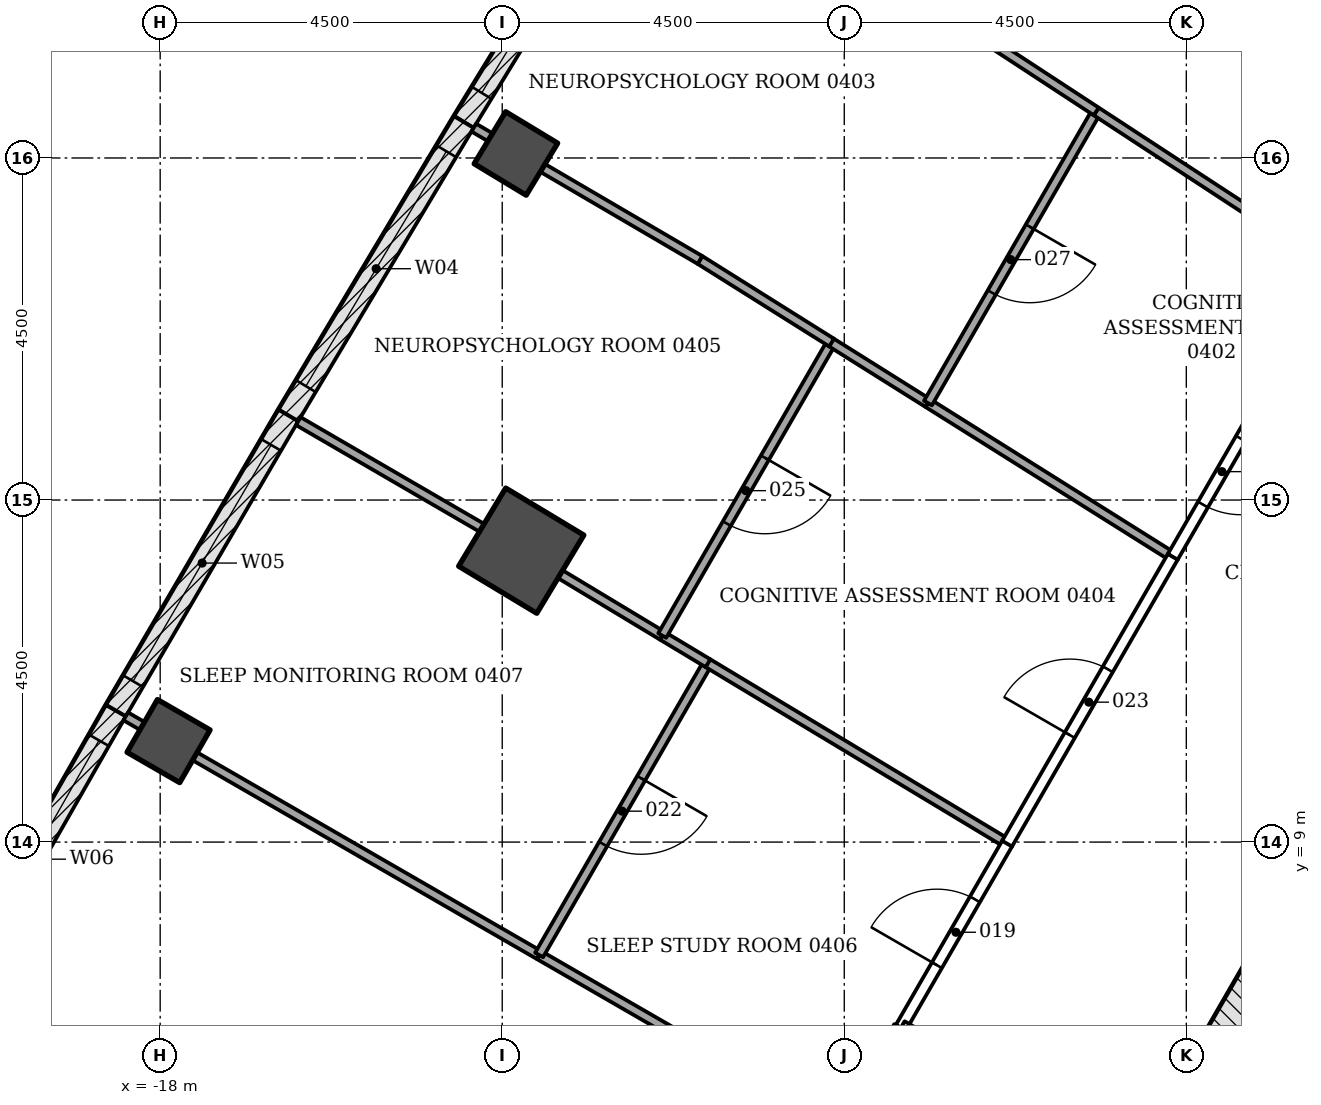
"""IFC4 building model, lengths in metres.
Left out: names, types, materials, properties, quantities, classifications, styles, units other than length and angle.
Written with IfcOpenShell. Run it as: python <this file> out.ifc"""

import sys

from ifc_helpers import new_model, si_unit, direction, frame, frame_2d, origin, origin_2d, place, context, subcontext, project, spatial, rectangle, extrude, element, fill, save


model = new_model("IFC4")
c1 = context("Model", 3, precision=1e-05, world=origin(), true_north=direction((0.0, 1.0)))
c2 = subcontext(c1, "Body", "Model", "MODEL_VIEW")
j1 = project(units=[si_unit("LENGTHUNIT", "METRE"), si_unit("PLANEANGLEUNIT", "RADIAN")], contexts=[c1])
p1 = place(None, origin())
s1 = spatial("IfcSite", under=j1, at=p1, CompositionType="ELEMENT")
p2 = place(p1, origin())
s2 = spatial("IfcBuilding", under=s1, at=p2, CompositionType="ELEMENT")
p3 = place(p2, frame((0.0, 0.0, 19.5)))
s3 = spatial("IfcBuildingStorey", under=s2, at=p3, CompositionType="ELEMENT", Elevation=19.5)
p4 = place(p3, frame((-13.25, 12.834, -0.25), z_axis=(0.0, 0.0, 1.0), x_axis=(-0.856599929156, 0.515981163775, 0.0)))
e1 = element("IfcColumn", 1, at=p4, inside=s3, PredefinedType="COLUMN", context=c2, shape_type="SweptSolid", body=[
    extrude(rectangle(XDim=1.2, YDim=1.2, at=origin_2d()), origin(), (0.0, 0.0, 1.0), 4.55),
])
for number, where, z_axis, x_axis in (
    (2, (-13.32, 18.059, -0.25), (0.0, 0.0, 1.0), (-0.856, 0.518, 0.0)),
    (3, (-17.89, 10.329, -0.25), (0.0, 0.0, 1.0), (-0.866, 0.5, 0.0)),
):
    element("IfcColumn", number, at=place(p3, frame(where, z_axis=z_axis, x_axis=x_axis)), inside=s3, PredefinedType="COLUMN", context=c2, shape_type="SweptSolid", body=[
        extrude(rectangle(XDim=0.8, YDim=0.8, at=origin_2d()), origin(), (0.0, 0.0, 1.0), 4.55),
    ])
p5 = place(p3, frame((-1.083, 11.281, -0.25), z_axis=(0.0, 0.0, 1.0), x_axis=(-0.500001446645, -0.866024568562, 0.0)))
e4 = element("IfcWall", 4, at=p5, inside=s3, PredefinedType="SHEAR", context=c2, shape_type="SweptSolid", body=[
    extrude(rectangle(XDim=18.458, YDim=0.7, at=frame_2d((9.229, 0.0))), origin(), (0.0, 0.0, 1.0), 4.55),
])
p6 = place(p5, frame((8.979, 0.0, 0.25)))
e5 = element("IfcOpeningElement", 5, at=p6, cuts=e4, PredefinedType="OPENING", context=c2, shape_type="SweptSolid", body=[
    extrude(rectangle(XDim=1.2, YDim=2.1, at=frame_2d((0.6, 1.05))), frame((0.0, 0.36, 0.0), z_axis=(0.0, -1.0, 0.0), x_axis=(1.0, 0.0, 0.0)), (0.0, 0.0, 1.0), 0.72),
])
p7 = place(p5, frame((11.029, 0.0, 0.25)))
e6 = element("IfcOpeningElement", 6, at=p7, cuts=e4, PredefinedType="OPENING", context=c2, shape_type="SweptSolid", body=[
    extrude(rectangle(XDim=1.2, YDim=2.1, at=frame_2d((0.6, 1.05))), frame((0.0, 0.36, 0.0), z_axis=(0.0, -1.0, 0.0), x_axis=(1.0, 0.0, 0.0)), (0.0, 0.0, 1.0), 0.72),
])
p8 = place(p3, frame((-14.004, 18.475, 0.0), z_axis=(0.0, 0.0, 1.0), x_axis=(0.522078085402, 0.852897691838, 0.0)))
e7 = element("IfcWall", 7, at=p8, inside=s3, PredefinedType="NOTDEFINED", context=c2, shape_type="SweptSolid", body=[
    extrude(rectangle(XDim=4.496, YDim=0.3, at=frame_2d((2.248, 0.0))), origin(), (0.0, 0.0, 1.0), 4.3),
])
p9 = place(p8, frame((0.448, 0.0, 1.5)))
e8 = element("IfcOpeningElement", 8, at=p9, cuts=e7, PredefinedType="OPENING", context=c2, shape_type="SweptSolid", body=[
    extrude(rectangle(XDim=3.6, YDim=1.8, at=frame_2d((1.8, 0.9))), frame((0.0, 0.16, 0.0), z_axis=(0.0, -1.0, 0.0), x_axis=(1.0, 0.0, 0.0)), (0.0, 0.0, 1.0), 0.32),
])
p10 = place(p3, frame((-16.313, 14.614, 0.0), z_axis=(0.0, 0.0, 1.0), x_axis=(0.513257465408, 0.858234684805, 0.0)))
e9 = element("IfcWall", 9, at=p10, inside=s3, PredefinedType="NOTDEFINED", context=c2, shape_type="SweptSolid", body=[
    extrude(rectangle(XDim=4.496, YDim=0.3, at=frame_2d((2.248, 0.0))), origin(), (0.0, 0.0, 1.0), 4.3),
])
p11 = place(p10, frame((0.448, 0.0, 1.5)))
e10 = element("IfcOpeningElement", 10, at=p11, cuts=e9, PredefinedType="OPENING", context=c2, shape_type="SweptSolid", body=[
    extrude(rectangle(XDim=3.6, YDim=1.8, at=frame_2d((1.8, 0.9))), frame((0.0, 0.16, 0.0), z_axis=(0.0, -1.0, 0.0), x_axis=(1.0, 0.0, 0.0)), (0.0, 0.0, 1.0), 0.32),
])
p12 = place(p3, frame((-18.582, 10.73, 0.0), z_axis=(0.0, 0.0, 1.0), x_axis=(0.50445499627, 0.86343798662, 0.0)))
e11 = element("IfcWall", 11, at=p12, inside=s3, PredefinedType="NOTDEFINED", context=c2, shape_type="SweptSolid", body=[
    extrude(rectangle(XDim=4.496, YDim=0.3, at=frame_2d((2.248, 0.0))), origin(), (0.0, 0.0, 1.0), 4.3),
])
p13 = place(p12, frame((0.448, 0.0, 1.5)))
e12 = element("IfcOpeningElement", 12, at=p13, cuts=e11, PredefinedType="OPENING", context=c2, shape_type="SweptSolid", body=[
    extrude(rectangle(XDim=3.6, YDim=1.8, at=frame_2d((1.8, 0.9))), frame((0.0, 0.16, 0.0), z_axis=(0.0, -1.0, 0.0), x_axis=(1.0, 0.0, 0.0)), (0.0, 0.0, 1.0), 0.32),
])
p14 = place(p3, frame((-20.811, 6.823, 0.0), z_axis=(0.0, 0.0, 1.0), x_axis=(0.495524760411, 0.868593812907, 0.0)))
e13 = element("IfcWall", 13, at=p14, inside=s3, PredefinedType="NOTDEFINED", context=c2, shape_type="SweptSolid", body=[
    extrude(rectangle(XDim=4.496, YDim=0.3, at=frame_2d((2.248, 0.0))), origin(), (0.0, 0.0, 1.0), 4.3),
])
p15 = place(p14, frame((0.448, 0.0, 1.5)))
e14 = element("IfcOpeningElement", 14, at=p15, cuts=e13, PredefinedType="OPENING", context=c2, shape_type="SweptSolid", body=[
    extrude(rectangle(XDim=3.6, YDim=1.8, at=frame_2d((1.8, 0.9))), frame((0.0, 0.16, 0.0), z_axis=(0.0, -1.0, 0.0), x_axis=(1.0, 0.0, 0.0)), (0.0, 0.0, 1.0), 0.32),
])
p16 = place(p3, frame((0.176, 6.711, 0.0), z_axis=(0.0, 0.0, 1.0), x_axis=(-0.500004227369, -0.866022963098, 0.0)))
e15 = element("IfcWall", 15, at=p16, inside=s3, PredefinedType="PARTITIONING", context=c2, shape_type="SweptSolid", body=[
    extrude(rectangle(XDim=11.8, YDim=0.25, at=frame_2d((5.9, 0.0))), origin(), (0.0, 0.0, 1.0), 4.3),
])
p17 = place(p3, frame((-18.26, 5.356, 0.0), z_axis=(0.0, 0.0, 1.0), x_axis=(-0.867283853893, 0.49781393791, 0.0)))
e16 = element("IfcWall", 16, at=p17, inside=s3, PredefinedType="PARTITIONING", context=c2, shape_type="SweptSolid", body=[
    extrude(rectangle(XDim=2.792, YDim=0.12, at=frame_2d((1.396, 0.0))), origin(), (0.0, 0.0, 1.0), 3.683),
])
p18 = place(p3, frame((-8.256, 6.555, 0.0), z_axis=(0.0, 0.0, 1.0), x_axis=(-0.499904469662, -0.866080551226, 0.0)))
e17 = element("IfcWall", 17, at=p18, inside=s3, PredefinedType="PARTITIONING", context=c2, shape_type="SweptSolid", body=[
    extrude(rectangle(XDim=1.548, YDim=0.2, at=frame_2d((0.774, 0.0))), origin(), (0.0, 0.0, 1.0), 3.688),
])
p19 = place(p3, frame((-5.226, 4.806, 0.0), z_axis=(0.0, 0.0, 1.0), x_axis=(-0.865949687125, 0.500131122175, 0.0)))
e18 = element("IfcWall", 18, at=p19, inside=s3, PredefinedType="PARTITIONING", context=c2, shape_type="SweptSolid", body=[
    extrude(rectangle(XDim=3.499, YDim=0.2, at=frame_2d((1.75, 0.0))), origin(), (0.0, 0.0, 1.0), 4.3),
])
p20 = place(p19, frame((0.95, 0.0, 0.0)))
e19 = element("IfcOpeningElement", 19, at=p20, cuts=e18, PredefinedType="OPENING", context=c2, shape_type="SweptSolid", body=[
    extrude(rectangle(XDim=1.5, YDim=2.1, at=frame_2d((0.75, 1.05))), frame((0.0, 0.11, 0.0), z_axis=(0.0, -1.0, 0.0), x_axis=(1.0, 0.0, 0.0)), (0.0, 0.0, 1.0), 0.22),
])
p21 = place(p3, frame((-9.032, 5.214, 0.0), z_axis=(0.0, 0.0, 1.0), x_axis=(-0.866038805516, 0.499976786802, 0.0)))
e20 = element("IfcWall", 20, at=p21, inside=s3, PredefinedType="PARTITIONING", context=c2, shape_type="SweptSolid", body=[
    extrude(rectangle(XDim=4.598, YDim=0.12, at=frame_2d((2.299, 0.0))), origin(), (0.0, 0.0, 1.0), 3.688),
])
p22 = place(p3, frame((-18.236, 10.528, 0.0), z_axis=(0.0, 0.0, 1.0), x_axis=(-0.864625231999, 0.50241736454, 0.0)))
e21 = element("IfcWall", 21, at=p22, inside=s3, PredefinedType="PARTITIONING", context=c2, shape_type="SweptSolid", body=[
    extrude(rectangle(XDim=0.251, YDim=0.12, at=frame_2d((0.125, 0.0))), origin(), (0.0, 0.0, 1.0), 4.3),
])
p23 = place(p3, frame((-13.017, 7.515, 0.0), z_axis=(0.0, 0.0, 1.0), x_axis=(-0.866023771128, 0.500002827834, 0.0)))
e22 = element("IfcWall", 22, at=p23, inside=s3, PredefinedType="PARTITIONING", context=c2, shape_type="SweptSolid", body=[
    extrude(rectangle(XDim=5.226, YDim=0.12, at=frame_2d((2.613, 0.0))), origin(), (0.0, 0.0, 1.0), 3.18),
])
p24 = place(p3, frame((-10.797, 11.355, 0.0), z_axis=(0.0, 0.0, 1.0), x_axis=(-0.500117989508, -0.865957271793, 0.0)))
e23 = element("IfcWall", 23, at=p24, inside=s3, PredefinedType="PARTITIONING", context=c2, shape_type="SweptSolid", body=[
    extrude(rectangle(XDim=4.435, YDim=0.12, at=frame_2d((2.217, 0.0))), origin(), (0.0, 0.0, 1.0), 3.688),
])
p25 = place(p24, frame((1.75, 0.0, 0.0)))
e24 = element("IfcOpeningElement", 24, at=p25, cuts=e23, PredefinedType="OPENING", context=c2, shape_type="SweptSolid", body=[
    extrude(rectangle(XDim=1.0, YDim=2.1, at=frame_2d((0.5, 1.05))), frame((0.0, 0.07, 0.0), z_axis=(0.0, -1.0, 0.0), x_axis=(1.0, 0.0, 0.0)), (0.0, 0.0, 1.0), 0.14),
])
p26 = place(p3, frame((-6.857, 8.983, 0.0), z_axis=(0.0, 0.0, 1.0), x_axis=(-0.856691171268, 0.515829658968, 0.0)))
e25 = element("IfcWall", 25, at=p26, inside=s3, PredefinedType="PARTITIONING", context=c2, shape_type="SweptSolid", body=[
    extrude(rectangle(XDim=4.6, YDim=0.12, at=frame_2d((2.3, 0.0))), origin(), (0.0, 0.0, 1.0), 3.698),
])
p27 = place(p3, frame((-8.256, 6.558, 0.0), z_axis=(0.0, 0.0, 1.0), x_axis=(0.500081734942, 0.86597820895, 0.0)))
e26 = element("IfcWall", 26, at=p27, inside=s3, PredefinedType="PARTITIONING", context=c2, shape_type="SweptSolid", body=[
    extrude(rectangle(XDim=2.804, YDim=0.15, at=frame_2d((1.402, 0.0))), origin(), (0.0, 0.0, 1.0), 3.698),
])
p28 = place(p27, frame((0.95, 0.0, 0.0)))
e27 = element("IfcOpeningElement", 27, at=p28, cuts=e26, PredefinedType="OPENING", context=c2, shape_type="SweptSolid", body=[
    extrude(rectangle(XDim=1.0, YDim=2.1, at=frame_2d((0.5, 1.05))), frame((0.0, 0.085, 0.0), z_axis=(0.0, -1.0, 0.0), x_axis=(1.0, 0.0, 0.0)), (0.0, 0.0, 1.0), 0.17),
])
p29 = place(p3, frame((-10.793, 11.353, 0.0), z_axis=(0.0, 0.0, 1.0), x_axis=(-0.856726860661, 0.515770381296, 0.0)))
e28 = element("IfcWall", 28, at=p29, inside=s3, PredefinedType="PARTITIONING", context=c2, shape_type="SweptSolid", body=[
    extrude(rectangle(XDim=0.704, YDim=0.12, at=frame_2d((0.352, 0.0))), origin(), (0.0, 0.0, 1.0), 3.698),
])
p30 = place(p3, frame((-13.769, 13.135, 0.0), z_axis=(0.0, 0.0, 1.0), x_axis=(-0.864576979504, 0.50250039454, 0.0)))
e29 = element("IfcWall", 29, at=p30, inside=s3, PredefinedType="PARTITIONING", context=c2, shape_type="SweptSolid", body=[
    extrude(rectangle(XDim=2.792, YDim=0.12, at=frame_2d((1.396, 0.0))), origin(), (0.0, 0.0, 1.0), 3.683),
])
p31 = place(p3, frame((-11.397, 11.717, 0.0), z_axis=(0.0, 0.0, 1.0), x_axis=(-0.85652691333, 0.516102360721, 0.0)))
e30 = element("IfcWall", 30, at=p31, inside=s3, PredefinedType="PARTITIONING", context=c2, shape_type="SweptSolid", body=[
    extrude(rectangle(XDim=1.563, YDim=0.12, at=frame_2d((0.782, 0.0))), origin(), (0.0, 0.0, 1.0), 3.698),
])
p32 = place(p3, frame((-6.858, 8.979, 0.0), z_axis=(0.0, 0.0, 1.0), x_axis=(0.500105111742, 0.865964708986, 0.0)))
e31 = element("IfcWall", 31, at=p32, inside=s3, PredefinedType="PARTITIONING", context=c2, shape_type="SweptSolid", body=[
    extrude(rectangle(XDim=4.363, YDim=0.15, at=frame_2d((2.181, 0.0))), origin(), (0.0, 0.0, 1.0), 3.698),
])
p33 = place(p32, frame((1.65, 0.0, 0.0)))
e32 = element("IfcOpeningElement", 32, at=p33, cuts=e31, PredefinedType="OPENING", context=c2, shape_type="SweptSolid", body=[
    extrude(rectangle(XDim=1.0, YDim=2.1, at=frame_2d((0.5, 1.05))), frame((0.0, 0.085, 0.0), z_axis=(0.0, -1.0, 0.0), x_axis=(1.0, 0.0, 0.0)), (0.0, 0.0, 1.0), 0.17),
])
p34 = place(p3, frame((-9.17, 15.572, 0.0), z_axis=(0.0, 0.0, 1.0), x_axis=(-0.499902881486, -0.866081467924, 0.0)))
e33 = element("IfcWall", 33, at=p34, inside=s3, PredefinedType="PARTITIONING", context=c2, shape_type="SweptSolid", body=[
    extrude(rectangle(XDim=4.451, YDim=0.12, at=frame_2d((2.226, 0.0))), origin(), (0.0, 0.0, 1.0), 3.698),
])
p35 = place(p34, frame((1.75, 0.0, 0.0)))
e34 = element("IfcOpeningElement", 34, at=p35, cuts=e33, PredefinedType="OPENING", context=c2, shape_type="SweptSolid", body=[
    extrude(rectangle(XDim=1.0, YDim=2.1, at=frame_2d((0.5, 1.05))), frame((0.0, 0.07, 0.0), z_axis=(0.0, -1.0, 0.0), x_axis=(1.0, 0.0, 0.0)), (0.0, 0.0, 1.0), 0.14),
])
p36 = place(p3, frame((-4.68, 12.753, 0.0), z_axis=(0.0, 0.0, 1.0), x_axis=(-0.846844902979, 0.531839929206, 0.0)))
e35 = element("IfcWall", 35, at=p36, inside=s3, PredefinedType="PARTITIONING", context=c2, shape_type="SweptSolid", body=[
    extrude(rectangle(XDim=3.8, YDim=0.12, at=frame_2d((1.9, 0.0))), origin(), (0.0, 0.0, 1.0), 3.698),
])
p37 = place(p3, frame((-7.901, 14.776, 0.0), z_axis=(0.0, 0.0, 1.0), x_axis=(-0.847002237732, 0.531589323892, 0.0)))
e36 = element("IfcWall", 36, at=p37, inside=s3, PredefinedType="PARTITIONING", context=c2, shape_type="SweptSolid", body=[
    extrude(rectangle(XDim=1.503, YDim=0.12, at=frame_2d((0.751, 0.0))), origin(), (0.0, 0.0, 1.0), 3.698),
])
p38 = place(p3, frame((-3.406, 14.956, 0.0), z_axis=(0.0, 0.0, 1.0), x_axis=(-0.499999364504, -0.866025770688, 0.0)))
e37 = element("IfcWall", 37, at=p38, inside=s3, PredefinedType="PARTITIONING", context=c2, shape_type="SweptSolid", body=[
    extrude(rectangle(XDim=2.544, YDim=0.15, at=frame_2d((1.272, 0.0))), origin(), (0.0, 0.0, 1.0), 3.698),
])
p39 = place(p38, frame((0.75, 0.0, 0.0)))
e38 = element("IfcOpeningElement", 38, at=p39, cuts=e37, PredefinedType="OPENING", context=c2, shape_type="SweptSolid", body=[
    extrude(rectangle(XDim=1.0, YDim=2.1, at=frame_2d((0.5, 1.05))), frame((0.0, 0.085, 0.0), z_axis=(0.0, -1.0, 0.0), x_axis=(1.0, 0.0, 0.0)), (0.0, 0.0, 1.0), 0.17),
])
p40 = place(p3, frame((-13.658, 18.273, 0.0), z_axis=(0.0, 0.0, 1.0), x_axis=(-0.863885093979, 0.503688936151, 0.0)))
e39 = element("IfcWall", 39, at=p40, inside=s3, PredefinedType="PARTITIONING", context=c2, shape_type="SweptSolid", body=[
    extrude(rectangle(XDim=0.25, YDim=0.12, at=frame_2d((0.125, 0.0))), origin(), (0.0, 0.0, 1.0), 4.3),
])
p41 = place(p3, frame((-9.166, 15.571, 0.0), z_axis=(0.0, 0.0, 1.0), x_axis=(-0.84701751501, 0.531564981227, 0.0)))
e40 = element("IfcWall", 40, at=p41, inside=s3, PredefinedType="PARTITIONING", context=c2, shape_type="SweptSolid", body=[
    extrude(rectangle(XDim=2.045, YDim=0.12, at=frame_2d((1.022, 0.0))), origin(), (0.0, 0.0, 1.0), 3.18),
])
p42 = place(p3, frame((-10.898, 16.658, 0.0), z_axis=(0.0, 0.0, 1.0), x_axis=(-0.863161652457, 0.504927679701, 0.0)))
e41 = element("IfcWall", 41, at=p42, inside=s3, PredefinedType="PARTITIONING", context=c2, shape_type="SweptSolid", body=[
    extrude(rectangle(XDim=2.398, YDim=0.12, at=frame_2d((1.199, 0.0))), origin(), (0.0, 0.0, 1.0), 3.18),
])
p43 = place(p3, frame((-5.684, 18.611, 0.0), z_axis=(0.0, 0.0, 1.0), x_axis=(-0.500099413844, -0.865967999567, 0.0)))
e42 = element("IfcWall", 42, at=p43, inside=s3, PredefinedType="PARTITIONING", context=c2, shape_type="SweptSolid", body=[
    extrude(rectangle(XDim=4.429, YDim=0.12, at=frame_2d((2.214, 0.0))), origin(), (0.0, 0.0, 1.0), 3.698),
])
p44 = place(p43, frame((1.75, 0.0, 0.0)))
e43 = element("IfcOpeningElement", 43, at=p44, cuts=e42, PredefinedType="OPENING", context=c2, shape_type="SweptSolid", body=[
    extrude(rectangle(XDim=1.0, YDim=2.1, at=frame_2d((0.5, 1.05))), frame((0.0, 0.07, 0.0), z_axis=(0.0, -1.0, 0.0), x_axis=(1.0, 0.0, 0.0)), (0.0, 0.0, 1.0), 0.14),
])
p45 = place(p3, frame((-2.252, 16.367, 0.0), z_axis=(0.0, 0.0, 1.0), x_axis=(-0.836925574982, 0.547316710819, 0.0)))
e44 = element("IfcWall", 44, at=p45, inside=s3, PredefinedType="PARTITIONING", context=c2, shape_type="SweptSolid", body=[
    extrude(rectangle(XDim=4.102, YDim=0.12, at=frame_2d((2.051, 0.0))), origin(), (0.0, 0.0, 1.0), 3.767),
])
p46 = place(p3, frame((-5.685, 18.612, 0.0), z_axis=(0.0, 0.0, 1.0), x_axis=(-0.836813840242, 0.547487531163, 0.0)))
e45 = element("IfcWall", 45, at=p46, inside=s3, PredefinedType="PARTITIONING", context=c2, shape_type="SweptSolid", body=[
    extrude(rectangle(XDim=2.734, YDim=0.12, at=frame_2d((1.367, 0.0))), origin(), (0.0, 0.0, 1.0), 3.767),
])
p47 = place(p9, origin())
e46 = element("IfcWindow", 46, at=p47, inside=s3, PartitioningType="SINGLE_PANEL", PredefinedType="WINDOW", context=c2, shape_type="SweptSolid", body=[
    extrude(rectangle(XDim=3.6, YDim=1.8, at=frame_2d((1.8, 0.9))), frame((0.0, 0.03, 0.0), z_axis=(0.0, -1.0, 0.0), x_axis=(1.0, 0.0, 0.0)), (0.0, 0.0, 1.0), 0.06),
])
fill(e8, e46)
p48 = place(p11, origin())
e47 = element("IfcWindow", 47, at=p48, inside=s3, PartitioningType="SINGLE_PANEL", PredefinedType="WINDOW", context=c2, shape_type="SweptSolid", body=[
    extrude(rectangle(XDim=3.6, YDim=1.8, at=frame_2d((1.8, 0.9))), frame((0.0, 0.03, 0.0), z_axis=(0.0, -1.0, 0.0), x_axis=(1.0, 0.0, 0.0)), (0.0, 0.0, 1.0), 0.06),
])
fill(e10, e47)
p49 = place(p13, origin())
e48 = element("IfcWindow", 48, at=p49, inside=s3, PartitioningType="SINGLE_PANEL", PredefinedType="WINDOW", context=c2, shape_type="SweptSolid", body=[
    extrude(rectangle(XDim=3.6, YDim=1.8, at=frame_2d((1.8, 0.9))), frame((0.0, 0.03, 0.0), z_axis=(0.0, -1.0, 0.0), x_axis=(1.0, 0.0, 0.0)), (0.0, 0.0, 1.0), 0.06),
])
fill(e12, e48)
p50 = place(p15, origin())
e49 = element("IfcWindow", 49, at=p50, inside=s3, PartitioningType="SINGLE_PANEL", PredefinedType="WINDOW", context=c2, shape_type="SweptSolid", body=[
    extrude(rectangle(XDim=3.6, YDim=1.8, at=frame_2d((1.8, 0.9))), frame((0.0, 0.03, 0.0), z_axis=(0.0, -1.0, 0.0), x_axis=(1.0, 0.0, 0.0)), (0.0, 0.0, 1.0), 0.06),
])
fill(e14, e49)
p51 = place(p28, origin())
e50 = element("IfcDoor", 50, at=p51, inside=s3, OperationType="SINGLE_SWING_RIGHT", PredefinedType="DOOR", context=c2, shape_type="SweptSolid", body=[
    extrude(rectangle(XDim=1.0, YDim=2.1, at=frame_2d((0.5, 1.05))), frame((0.0, 0.025, 0.0), z_axis=(0.0, -1.0, 0.0), x_axis=(1.0, 0.0, 0.0)), (0.0, 0.0, 1.0), 0.05),
])
fill(e27, e50)
p52 = place(p25, origin())
e51 = element("IfcDoor", 51, at=p52, inside=s3, OperationType="SINGLE_SWING_LEFT", PredefinedType="DOOR", context=c2, shape_type="SweptSolid", body=[
    extrude(rectangle(XDim=1.0, YDim=2.1, at=frame_2d((0.5, 1.05))), frame((0.0, 0.025, 0.0), z_axis=(0.0, -1.0, 0.0), x_axis=(1.0, 0.0, 0.0)), (0.0, 0.0, 1.0), 0.05),
])
fill(e24, e51)
p53 = place(p33, origin())
e52 = element("IfcDoor", 52, at=p53, inside=s3, OperationType="SINGLE_SWING_LEFT", PredefinedType="DOOR", context=c2, shape_type="SweptSolid", body=[
    extrude(rectangle(XDim=1.0, YDim=2.1, at=frame_2d((0.5, 1.05))), frame((0.0, 0.025, 0.0), z_axis=(0.0, -1.0, 0.0), x_axis=(1.0, 0.0, 0.0)), (0.0, 0.0, 1.0), 0.05),
])
fill(e32, e52)
p54 = place(p35, origin())
e53 = element("IfcDoor", 53, at=p54, inside=s3, OperationType="SINGLE_SWING_LEFT", PredefinedType="DOOR", context=c2, shape_type="SweptSolid", body=[
    extrude(rectangle(XDim=1.0, YDim=2.1, at=frame_2d((0.5, 1.05))), frame((0.0, 0.025, 0.0), z_axis=(0.0, -1.0, 0.0), x_axis=(1.0, 0.0, 0.0)), (0.0, 0.0, 1.0), 0.05),
])
fill(e34, e53)
p55 = place(p39, origin())
e54 = element("IfcDoor", 54, at=p55, inside=s3, OperationType="SINGLE_SWING_RIGHT", PredefinedType="DOOR", context=c2, shape_type="SweptSolid", body=[
    extrude(rectangle(XDim=1.0, YDim=2.1, at=frame_2d((0.5, 1.05))), frame((0.0, 0.025, 0.0), z_axis=(0.0, -1.0, 0.0), x_axis=(1.0, 0.0, 0.0)), (0.0, 0.0, 1.0), 0.05),
])
fill(e38, e54)
p56 = place(p44, origin())
e55 = element("IfcDoor", 55, at=p56, inside=s3, OperationType="SINGLE_SWING_LEFT", PredefinedType="DOOR", context=c2, shape_type="SweptSolid", body=[
    extrude(rectangle(XDim=1.0, YDim=2.1, at=frame_2d((0.5, 1.05))), frame((0.0, 0.025, 0.0), z_axis=(0.0, -1.0, 0.0), x_axis=(1.0, 0.0, 0.0)), (0.0, 0.0, 1.0), 0.05),
])
fill(e43, e55)
save(model, sys.argv[1])
